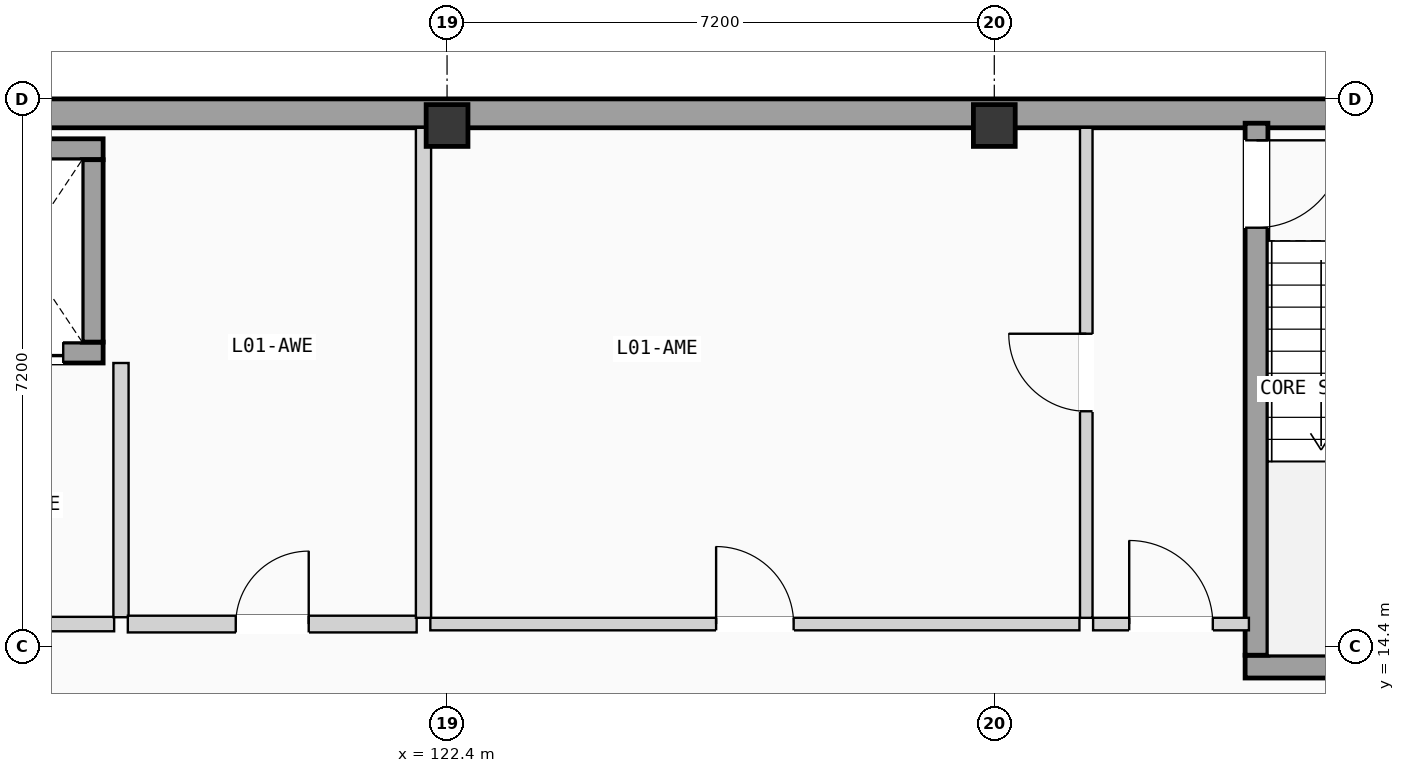
"""IFC4 building model, lengths in metres.
Left out: names, types, materials, properties, quantities, classifications, styles, units other than length and angle.
Written with IfcOpenShell. Run it as: python <this file> out.ifc"""

import sys

from ifc_helpers import new_model, si_unit, direction, frame, frame_2d, origin, origin_2d, place, context, subcontext, project, spatial, rectangle, extrude, element, fill, save


model = new_model("IFC4")
c1 = context("Model", 3, precision=1e-05, world=origin(), true_north=direction((0.0, 1.0)))
c2 = subcontext(c1, "Body", "Model", "MODEL_VIEW")
j1 = project(units=[si_unit("LENGTHUNIT", "METRE"), si_unit("PLANEANGLEUNIT", "RADIAN")], contexts=[c1])
p1 = place(None, origin())
s1 = spatial("IfcSite", under=j1, at=p1, CompositionType="ELEMENT")
p2 = place(p1, origin())
s2 = spatial("IfcBuilding", under=s1, at=p2, CompositionType="ELEMENT")
p3 = place(p2, frame((0.0, 0.0, 4.9)))
s3 = spatial("IfcBuildingStorey", under=s2, at=p3, CompositionType="ELEMENT", Elevation=4.9)
for number, where, z_axis, x_axis in (
    (1, (122.4, 21.25, 0.0), (0.0, 0.0, 1.0), (1.0, 0.0, 0.0)),
    (2, (129.6, 21.25, 0.0), (0.0, 0.0, 1.0), (1.0, 0.0, 0.0)),
):
    element("IfcColumn", number, at=place(p3, frame(where, z_axis=z_axis, x_axis=x_axis)), inside=s3, PredefinedType="COLUMN", context=c2, shape_type="SweptSolid", body=[
        extrude(rectangle(XDim=0.55, YDim=0.55, at=origin_2d()), origin(), (0.0, 0.0, 1.0), 3.675),
    ])
p4 = place(p3, frame((108.0, 21.41, 0.0), z_axis=(0.0, 0.0, 1.0), x_axis=(1.0, 0.0, 0.0)))
e3 = element("IfcWall", 3, at=p4, inside=s3, PredefinedType="SOLIDWALL", context=c2, shape_type="SweptSolid", body=[
    extrude(rectangle(XDim=28.8, YDim=0.38, at=frame_2d((14.4, 0.0))), origin(), (0.0, 0.0, 1.0), 3.4),
])
p5 = place(p3, frame((132.9, 14.13, 0.0), z_axis=(0.0, 0.0, 1.0), x_axis=(1.0, 0.0, 0.0)))
e4 = element("IfcWall", 4, at=p5, inside=s3, PredefinedType="SHEAR", context=c2, shape_type="SweptSolid", body=[
    extrude(rectangle(XDim=3.6, YDim=0.3, at=frame_2d((1.8, 0.0))), origin(), (0.0, 0.0, 1.0), 3.4),
])
p6 = place(p3, frame((133.05, 14.28, 0.0), z_axis=(0.0, 0.0, 1.0), x_axis=(0.0, 1.0, 0.0)))
e5 = element("IfcWall", 5, at=p6, inside=s3, PredefinedType="SHEAR", context=c2, shape_type="SweptSolid", body=[
    extrude(rectangle(XDim=7.0, YDim=0.3, at=frame_2d((3.5, 0.0))), origin(), (0.0, 0.0, 1.0), 3.4),
])
p7 = place(p6, frame((5.625, 0.0, 0.0)))
e6 = element("IfcOpeningElement", 6, at=p7, cuts=e5, PredefinedType="OPENING", context=c2, shape_type="SweptSolid", body=[
    extrude(rectangle(XDim=1.15, YDim=2.12, at=frame_2d((0.575, 1.06))), frame((0.0, 0.16, 0.0), z_axis=(0.0, -1.0, 0.0), x_axis=(1.0, 0.0, 0.0)), (0.0, 0.0, 1.0), 0.32),
])
p8 = place(p3, frame((115.725, 18.262, 0.0), z_axis=(0.0, 0.0, 1.0), x_axis=(1.0, 0.0, 0.0)))
e7 = element("IfcWall", 7, at=p8, inside=s3, PredefinedType="SHEAR", context=c2, shape_type="SweptSolid", body=[
    extrude(rectangle(XDim=2.15, YDim=0.275, at=frame_2d((1.075, 0.0))), origin(), (0.0, 0.0, 1.0), 3.4),
])
p9 = place(p8, frame((0.525, 0.0, 0.0)))
e8 = element("IfcOpeningElement", 8, at=p9, cuts=e7, PredefinedType="OPENING", context=c2, shape_type="SweptSolid", body=[
    extrude(rectangle(XDim=1.1, YDim=2.15, at=frame_2d((0.55, 1.075))), frame((0.0, 0.147, 0.0), z_axis=(0.0, -1.0, 0.0), x_axis=(1.0, 0.0, 0.0)), (0.0, 0.0, 1.0), 0.295),
])
p10 = place(p3, frame((115.475, 20.938, 0.0), z_axis=(0.0, 0.0, 1.0), x_axis=(1.0, 0.0, 0.0)))
e9 = element("IfcWall", 9, at=p10, inside=s3, PredefinedType="SHEAR", context=c2, shape_type="SweptSolid", body=[
    extrude(rectangle(XDim=2.4, YDim=0.275, at=frame_2d((1.2, 0.0))), origin(), (0.0, 0.0, 1.0), 3.4),
])
p11 = place(p3, frame((117.738, 18.4, 0.0), z_axis=(0.0, 0.0, 1.0), x_axis=(0.0, 1.0, 0.0)))
e10 = element("IfcWall", 10, at=p11, inside=s3, PredefinedType="SHEAR", context=c2, shape_type="SweptSolid", body=[
    extrude(rectangle(XDim=2.4, YDim=0.275, at=frame_2d((1.2, 0.0))), origin(), (0.0, 0.0, 1.0), 3.4),
])
p12 = place(p3, frame((111.85, 14.69, 0.0), z_axis=(0.0, 0.0, 1.0), x_axis=(1.0, 0.0, 0.0)))
e11 = element("IfcWall", 11, at=p12, inside=s3, PredefinedType="PARTITIONING", context=c2, shape_type="SweptSolid", body=[
    extrude(rectangle(XDim=6.17, YDim=0.19, at=frame_2d((3.085, 0.0))), origin(), (0.0, 0.0, 1.0), 3.39),
])
p13 = place(p12, frame((2.535, 0.0, 0.0)))
e12 = element("IfcOpeningElement", 12, at=p13, cuts=e11, PredefinedType="OPENING", context=c2, shape_type="SweptSolid", body=[
    extrude(rectangle(XDim=1.1, YDim=2.12, at=frame_2d((0.55, 1.06))), frame((0.0, 0.105, 0.0), z_axis=(0.0, -1.0, 0.0), x_axis=(1.0, 0.0, 0.0)), (0.0, 0.0, 1.0), 0.21),
])
p14 = place(p3, frame((118.11, 14.78, 0.0), z_axis=(0.0, 0.0, 1.0), x_axis=(0.0, 1.0, 0.0)))
e13 = element("IfcWall", 13, at=p14, inside=s3, PredefinedType="PLUMBINGWALL", context=c2, shape_type="SweptSolid", body=[
    extrude(rectangle(XDim=3.345, YDim=0.2, at=frame_2d((1.672, 0.0))), origin(), (0.0, 0.0, 1.0), 3.39),
])
p15 = place(p3, frame((130.9, 14.69, 0.0), z_axis=(0.0, 0.0, 1.0), x_axis=(1.0, 0.0, 0.0)))
e14 = element("IfcWall", 14, at=p15, inside=s3, PredefinedType="PARTITIONING", context=c2, shape_type="SweptSolid", body=[
    extrude(rectangle(XDim=2.05, YDim=0.165, at=frame_2d((1.025, 0.0))), origin(), (0.0, 0.0, 1.0), 3.39),
])
p16 = place(p15, frame((0.475, 0.0, 0.0)))
e15 = element("IfcOpeningElement", 15, at=p16, cuts=e14, PredefinedType="OPENING", context=c2, shape_type="SweptSolid", body=[
    extrude(rectangle(XDim=1.1, YDim=2.12, at=frame_2d((0.55, 1.06))), frame((0.0, 0.093, 0.0), z_axis=(0.0, -1.0, 0.0), x_axis=(1.0, 0.0, 0.0)), (0.0, 0.0, 1.0), 0.185),
])
p17 = place(p3, frame((118.2, 14.69, 0.0), z_axis=(0.0, 0.0, 1.0), x_axis=(1.0, 0.0, 0.0)))
e16 = element("IfcWall", 16, at=p17, inside=s3, PredefinedType="PLUMBINGWALL", context=c2, shape_type="SweptSolid", body=[
    extrude(rectangle(XDim=3.8, YDim=0.22, at=frame_2d((1.9, 0.0))), origin(), (0.0, 0.0, 1.0), 3.39),
])
p18 = place(p17, frame((1.42, 0.0, 0.0)))
e17 = element("IfcOpeningElement", 17, at=p18, cuts=e16, PredefinedType="OPENING", context=c2, shape_type="SweptSolid", body=[
    extrude(rectangle(XDim=0.96, YDim=2.05, at=frame_2d((0.48, 1.025))), frame((0.0, 0.12, 0.0), z_axis=(0.0, -1.0, 0.0), x_axis=(1.0, 0.0, 0.0)), (0.0, 0.0, 1.0), 0.24),
])
p19 = place(p3, frame((122.18, 14.69, 0.0), z_axis=(0.0, 0.0, 1.0), x_axis=(1.0, 0.0, 0.0)))
e18 = element("IfcWall", 18, at=p19, inside=s3, PredefinedType="PARTITIONING", context=c2, shape_type="SweptSolid", body=[
    extrude(rectangle(XDim=8.54, YDim=0.165, at=frame_2d((4.27, 0.0))), origin(), (0.0, 0.0, 1.0), 3.39),
])
p20 = place(p19, frame((3.76, 0.0, 0.0)))
e19 = element("IfcOpeningElement", 19, at=p20, cuts=e18, PredefinedType="OPENING", context=c2, shape_type="SweptSolid", body=[
    extrude(rectangle(XDim=1.02, YDim=2.16, at=frame_2d((0.51, 1.08))), frame((0.0, 0.093, 0.0), z_axis=(0.0, -1.0, 0.0), x_axis=(1.0, 0.0, 0.0)), (0.0, 0.0, 1.0), 0.185),
])
p21 = place(p3, frame((130.81, 14.772, 0.0), z_axis=(0.0, 0.0, 1.0), x_axis=(0.0, 1.0, 0.0)))
e20 = element("IfcWall", 20, at=p21, inside=s3, PredefinedType="PARTITIONING", context=c2, shape_type="SweptSolid", body=[
    extrude(rectangle(XDim=6.448, YDim=0.165, at=frame_2d((3.224, 0.0))), origin(), (0.0, 0.0, 1.0), 3.39),
])
p22 = place(p21, frame((2.718, 0.0, 0.0)))
e21 = element("IfcOpeningElement", 21, at=p22, cuts=e20, PredefinedType="OPENING", context=c2, shape_type="SweptSolid", body=[
    extrude(rectangle(XDim=1.02, YDim=2.16, at=frame_2d((0.51, 1.08))), frame((0.0, 0.093, 0.0), z_axis=(0.0, -1.0, 0.0), x_axis=(1.0, 0.0, 0.0)), (0.0, 0.0, 1.0), 0.185),
])
p23 = place(p3, frame((122.09, 14.772, 0.0), z_axis=(0.0, 0.0, 1.0), x_axis=(0.0, 1.0, 0.0)))
e22 = element("IfcWall", 22, at=p23, inside=s3, PredefinedType="PLUMBINGWALL", context=c2, shape_type="SweptSolid", body=[
    extrude(rectangle(XDim=6.448, YDim=0.2, at=frame_2d((3.224, 0.0))), origin(), (0.0, 0.0, 1.0), 2.77),
])
p24 = place(p7, frame((1.15, 0.0, 0.0), z_axis=(0.0, 0.0, 1.0), x_axis=(-1.0, 0.0, 0.0)))
e23 = element("IfcDoor", 23, at=p24, inside=s3, OperationType="SINGLE_SWING_RIGHT", PredefinedType="DOOR", context=c2, shape_type="SweptSolid", body=[
    extrude(rectangle(XDim=1.15, YDim=2.12, at=frame_2d((0.575, 1.06))), frame((0.0, 0.025, 0.0), z_axis=(0.0, -1.0, 0.0), x_axis=(1.0, 0.0, 0.0)), (0.0, 0.0, 1.0), 0.05),
])
fill(e6, e23)
p25 = place(p9, origin())
e24 = element("IfcDoor", 24, at=p25, inside=s3, OperationType="SLIDING_TO_LEFT", PredefinedType="DOOR", context=c2, shape_type="SweptSolid", body=[
    extrude(rectangle(XDim=1.1, YDim=2.15, at=frame_2d((0.55, 1.075))), frame((0.0, 0.025, 0.0), z_axis=(0.0, -1.0, 0.0), x_axis=(1.0, 0.0, 0.0)), (0.0, 0.0, 1.0), 0.05),
])
fill(e8, e24)
p26 = place(p16, origin())
e25 = element("IfcDoor", 25, at=p26, inside=s3, OperationType="SINGLE_SWING_LEFT", PredefinedType="DOOR", context=c2, shape_type="SweptSolid", body=[
    extrude(rectangle(XDim=1.1, YDim=2.12, at=frame_2d((0.55, 1.06))), frame((0.0, 0.025, 0.0), z_axis=(0.0, -1.0, 0.0), x_axis=(1.0, 0.0, 0.0)), (0.0, 0.0, 1.0), 0.05),
])
fill(e15, e25)
p27 = place(p18, origin())
e26 = element("IfcDoor", 26, at=p27, inside=s3, OperationType="SINGLE_SWING_RIGHT", PredefinedType="DOOR", context=c2, shape_type="SweptSolid", body=[
    extrude(rectangle(XDim=0.96, YDim=2.05, at=frame_2d((0.48, 1.025))), frame((0.0, 0.025, 0.0), z_axis=(0.0, -1.0, 0.0), x_axis=(1.0, 0.0, 0.0)), (0.0, 0.0, 1.0), 0.05),
])
fill(e17, e26)
p28 = place(p20, origin())
e27 = element("IfcDoor", 27, at=p28, inside=s3, OperationType="SINGLE_SWING_LEFT", PredefinedType="DOOR", context=c2, shape_type="SweptSolid", body=[
    extrude(rectangle(XDim=1.02, YDim=2.16, at=frame_2d((0.51, 1.08))), frame((0.0, 0.025, 0.0), z_axis=(0.0, -1.0, 0.0), x_axis=(1.0, 0.0, 0.0)), (0.0, 0.0, 1.0), 0.05),
])
fill(e19, e27)
p29 = place(p22, origin())
e28 = element("IfcDoor", 28, at=p29, inside=s3, OperationType="SINGLE_SWING_RIGHT", PredefinedType="DOOR", context=c2, shape_type="SweptSolid", body=[
    extrude(rectangle(XDim=1.02, YDim=2.16, at=frame_2d((0.51, 1.08))), frame((0.0, 0.025, 0.0), z_axis=(0.0, -1.0, 0.0), x_axis=(1.0, 0.0, 0.0)), (0.0, 0.0, 1.0), 0.05),
])
fill(e21, e28)
save(model, sys.argv[1])
